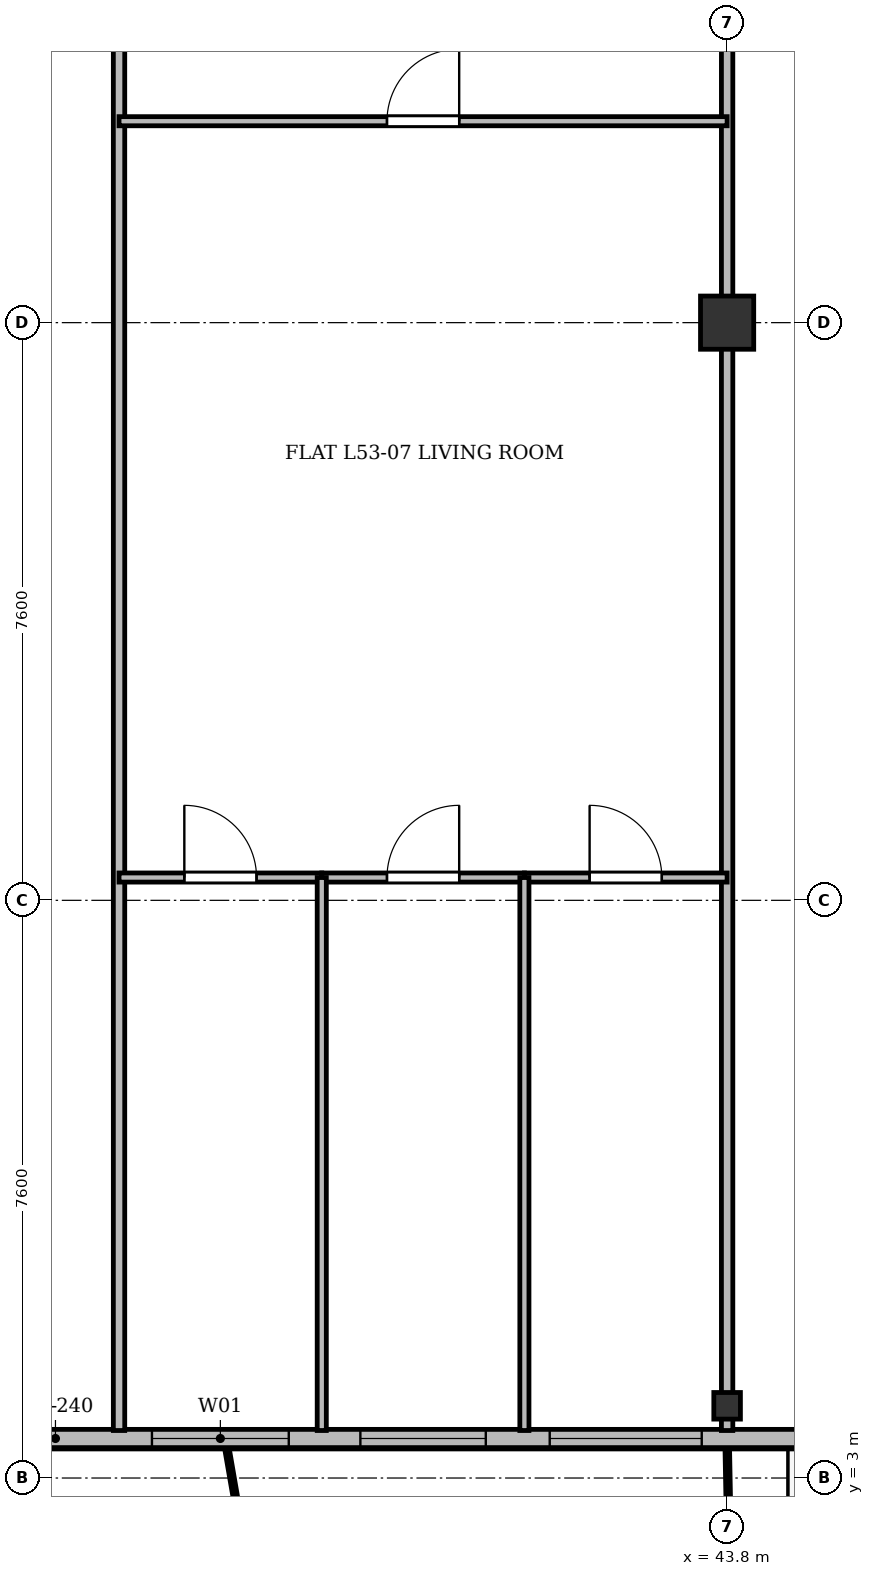
"""IFC4 building model, lengths in metres.
Left out: names, types, materials, properties, quantities, classifications, styles, units other than length and angle.
Written with IfcOpenShell. Run it as: python <this file> out.ifc"""

import sys

from ifc_helpers import new_model, si_unit, direction, frame, frame_2d, origin, origin_2d, place, context, subcontext, project, spatial, rectangle, i_section, extrude, source, transform, mapped, element, fill, save


model = new_model("IFC4")
c1 = context("Model", 3, precision=1e-05, world=origin(), true_north=direction((0.0, 1.0)))
c2 = subcontext(c1, "Body", "Model", "MODEL_VIEW")
j1 = project(units=[si_unit("LENGTHUNIT", "METRE"), si_unit("PLANEANGLEUNIT", "RADIAN")], contexts=[c1])
p1 = place(None, origin())
s1 = spatial("IfcSite", under=j1, at=p1, CompositionType="ELEMENT")
p2 = place(p1, origin())
s2 = spatial("IfcBuilding", under=s1, at=p2, CompositionType="ELEMENT")
p3 = place(p2, frame((0.0, 0.0, 204.9)))
s3 = spatial("IfcBuildingStorey", under=s2, at=p3, CompositionType="ELEMENT", Elevation=204.9)
m1 = source(origin(), c2, "Body", "SweptSolid", [
    extrude(i_section(OverallWidth=0.35, OverallDepth=0.35, WebThickness=0.018, FlangeThickness=0.028, at=origin_2d()), origin(), (0.0, 0.0, 1.0), 3.6),
])
p4 = place(p3, frame((43.8, 3.95, 0.0), z_axis=(0.0, 0.0, 1.0), x_axis=(1.0, 0.0, 0.0)))
e1 = element("IfcColumn", 1, at=p4, inside=s3, PredefinedType="COLUMN", context=c2, shape_type="MappedRepresentation", body=[
    mapped(m1, transform((0.0, 0.0, 0.0), x_axis=(1.0, 0.0, 0.0), y_axis=(0.0, 1.0, 0.0), z_axis=(0.0, 0.0, 1.0), scale=1.0)),
])
m2 = source(origin(), c2, "Body", "SweptSolid", [
    extrude(rectangle(XDim=0.7, YDim=0.7, at=origin_2d()), origin(), (0.0, 0.0, 1.0), 3.6),
])
p5 = place(p3, frame((43.8, 18.2, 0.0), z_axis=(0.0, 0.0, 1.0), x_axis=(1.0, 0.0, 0.0)))
e2 = element("IfcColumn", 2, at=p5, inside=s3, PredefinedType="COLUMN", context=c2, shape_type="MappedRepresentation", body=[
    mapped(m2, transform((0.0, 0.0, 0.0), x_axis=(1.0, 0.0, 0.0), y_axis=(0.0, 1.0, 0.0), z_axis=(0.0, 0.0, 1.0), scale=1.0)),
])
p6 = place(p3, frame((63.4, 3.52, 0.0), z_axis=(0.0, 0.0, 1.0), x_axis=(-1.0, 0.0, 0.0)))
e3 = element("IfcWall", 3, at=p6, inside=s3, PredefinedType="SOLIDWALL", context=c2, shape_type="SweptSolid", body=[
    extrude(rectangle(XDim=52.4, YDim=0.24, at=frame_2d((26.2, 0.0))), origin(), (0.0, 0.0, 1.0), 3.36),
])
p7 = place(p6, frame((1.345, 0.0, 0.9)))
e4 = element("IfcOpeningElement", 4, at=p7, cuts=e3, PredefinedType="OPENING", context=c2, shape_type="SweptSolid", body=[
    extrude(rectangle(XDim=2.0, YDim=1.95, at=frame_2d((1.0, 0.975))), frame((0.0, 0.13, 0.0), z_axis=(0.0, -1.0, 0.0), x_axis=(1.0, 0.0, 0.0)), (0.0, 0.0, 1.0), 0.26),
])
p8 = place(p6, frame((5.075, 0.0, 0.9)))
e5 = element("IfcOpeningElement", 5, at=p8, cuts=e3, PredefinedType="OPENING", context=c2, shape_type="SweptSolid", body=[
    extrude(rectangle(XDim=1.65, YDim=1.85, at=frame_2d((0.825, 0.925))), frame((0.0, 0.13, 0.0), z_axis=(0.0, -1.0, 0.0), x_axis=(1.0, 0.0, 0.0)), (0.0, 0.0, 1.0), 0.26),
])
p9 = place(p6, frame((7.45, 0.0, 0.9)))
e6 = element("IfcOpeningElement", 6, at=p9, cuts=e3, PredefinedType="OPENING", context=c2, shape_type="SweptSolid", body=[
    extrude(rectangle(XDim=1.5, YDim=1.75, at=frame_2d((0.75, 0.875))), frame((0.0, 0.13, 0.0), z_axis=(0.0, -1.0, 0.0), x_axis=(1.0, 0.0, 0.0)), (0.0, 0.0, 1.0), 0.26),
])
p10 = place(p6, frame((9.7, 0.0, 0.9)))
e7 = element("IfcOpeningElement", 7, at=p10, cuts=e3, PredefinedType="OPENING", context=c2, shape_type="SweptSolid", body=[
    extrude(rectangle(XDim=2.2, YDim=1.8, at=frame_2d((1.1, 0.9))), frame((0.0, 0.13, 0.0), z_axis=(0.0, -1.0, 0.0), x_axis=(1.0, 0.0, 0.0)), (0.0, 0.0, 1.0), 0.26),
])
p11 = place(p6, frame((14.217, 0.0, 0.0)))
e8 = element("IfcOpeningElement", 8, at=p11, cuts=e3, PredefinedType="OPENING", context=c2, shape_type="SweptSolid", body=[
    extrude(rectangle(XDim=1.2, YDim=2.2, at=frame_2d((0.6, 1.1))), frame((0.0, 0.13, 0.0), z_axis=(0.0, -1.0, 0.0), x_axis=(1.0, 0.0, 0.0)), (0.0, 0.0, 1.0), 0.26),
])
p12 = place(p6, frame((19.934, 0.0, 0.9)))
e9 = element("IfcOpeningElement", 9, at=p12, cuts=e3, PredefinedType="OPENING", context=c2, shape_type="SweptSolid", body=[
    extrude(rectangle(XDim=2.0, YDim=1.95, at=frame_2d((1.0, 0.975))), frame((0.0, 0.13, 0.0), z_axis=(0.0, -1.0, 0.0), x_axis=(1.0, 0.0, 0.0)), (0.0, 0.0, 1.0), 0.26),
])
p13 = place(p6, frame((22.775, 0.0, 0.9)))
e10 = element("IfcOpeningElement", 10, at=p13, cuts=e3, PredefinedType="OPENING", context=c2, shape_type="SweptSolid", body=[
    extrude(rectangle(XDim=1.65, YDim=1.85, at=frame_2d((0.825, 0.925))), frame((0.0, 0.13, 0.0), z_axis=(0.0, -1.0, 0.0), x_axis=(1.0, 0.0, 0.0)), (0.0, 0.0, 1.0), 0.26),
])
p14 = place(p6, frame((25.367, 0.0, 0.9)))
e11 = element("IfcOpeningElement", 11, at=p14, cuts=e3, PredefinedType="OPENING", context=c2, shape_type="SweptSolid", body=[
    extrude(rectangle(XDim=1.8, YDim=1.8, at=frame_2d((0.9, 0.9))), frame((0.0, 0.13, 0.0), z_axis=(0.0, -1.0, 0.0), x_axis=(1.0, 0.0, 0.0)), (0.0, 0.0, 1.0), 0.26),
])
p15 = place(p6, frame((29.1, 0.0, 0.9)))
e12 = element("IfcOpeningElement", 12, at=p15, cuts=e3, PredefinedType="OPENING", context=c2, shape_type="SweptSolid", body=[
    extrude(rectangle(XDim=2.2, YDim=1.8, at=frame_2d((1.1, 0.9))), frame((0.0, 0.13, 0.0), z_axis=(0.0, -1.0, 0.0), x_axis=(1.0, 0.0, 0.0)), (0.0, 0.0, 1.0), 0.26),
])
p16 = place(p6, frame((33.25, 0.0, 0.9)))
e13 = element("IfcOpeningElement", 13, at=p16, cuts=e3, PredefinedType="OPENING", context=c2, shape_type="SweptSolid", body=[
    extrude(rectangle(XDim=1.5, YDim=1.75, at=frame_2d((0.75, 0.875))), frame((0.0, 0.13, 0.0), z_axis=(0.0, -1.0, 0.0), x_axis=(1.0, 0.0, 0.0)), (0.0, 0.0, 1.0), 0.26),
])
p17 = place(p6, frame((35.65, 0.0, 0.9)))
e14 = element("IfcOpeningElement", 14, at=p17, cuts=e3, PredefinedType="OPENING", context=c2, shape_type="SweptSolid", body=[
    extrude(rectangle(XDim=1.5, YDim=1.75, at=frame_2d((0.75, 0.875))), frame((0.0, 0.13, 0.0), z_axis=(0.0, -1.0, 0.0), x_axis=(1.0, 0.0, 0.0)), (0.0, 0.0, 1.0), 0.26),
])
p18 = place(p6, frame((37.975, 0.0, 0.9)))
e15 = element("IfcOpeningElement", 15, at=p18, cuts=e3, PredefinedType="OPENING", context=c2, shape_type="SweptSolid", body=[
    extrude(rectangle(XDim=1.65, YDim=1.85, at=frame_2d((0.825, 0.925))), frame((0.0, 0.13, 0.0), z_axis=(0.0, -1.0, 0.0), x_axis=(1.0, 0.0, 0.0)), (0.0, 0.0, 1.0), 0.26),
])
p19 = place(p6, frame((41.456, 0.0, 0.0)))
e16 = element("IfcOpeningElement", 16, at=p19, cuts=e3, PredefinedType="OPENING", context=c2, shape_type="SweptSolid", body=[
    extrude(rectangle(XDim=1.2, YDim=2.2, at=frame_2d((0.6, 1.1))), frame((0.0, 0.13, 0.0), z_axis=(0.0, -1.0, 0.0), x_axis=(1.0, 0.0, 0.0)), (0.0, 0.0, 1.0), 0.26),
])
p20 = place(p6, frame((43.45, 0.0, 0.9)))
e17 = element("IfcOpeningElement", 17, at=p20, cuts=e3, PredefinedType="OPENING", context=c2, shape_type="SweptSolid", body=[
    extrude(rectangle(XDim=1.5, YDim=1.75, at=frame_2d((0.75, 0.875))), frame((0.0, 0.13, 0.0), z_axis=(0.0, -1.0, 0.0), x_axis=(1.0, 0.0, 0.0)), (0.0, 0.0, 1.0), 0.26),
])
p21 = place(p6, frame((45.75, 0.0, 0.9)))
e18 = element("IfcOpeningElement", 18, at=p21, cuts=e3, PredefinedType="OPENING", context=c2, shape_type="SweptSolid", body=[
    extrude(rectangle(XDim=1.5, YDim=1.75, at=frame_2d((0.75, 0.875))), frame((0.0, 0.13, 0.0), z_axis=(0.0, -1.0, 0.0), x_axis=(1.0, 0.0, 0.0)), (0.0, 0.0, 1.0), 0.26),
])
p22 = place(p6, frame((49.055, 0.0, 0.9)))
e19 = element("IfcOpeningElement", 19, at=p22, cuts=e3, PredefinedType="OPENING", context=c2, shape_type="SweptSolid", body=[
    extrude(rectangle(XDim=2.0, YDim=1.95, at=frame_2d((1.0, 0.975))), frame((0.0, 0.13, 0.0), z_axis=(0.0, -1.0, 0.0), x_axis=(1.0, 0.0, 0.0)), (0.0, 0.0, 1.0), 0.26),
])
p23 = place(p3, frame((35.8, 3.625, 0.0), z_axis=(0.0, 0.0, 1.0), x_axis=(0.0, 1.0, 0.0)))
e20 = element("IfcWall", 20, at=p23, inside=s3, PredefinedType="PARTITIONING", context=c2, shape_type="SweptSolid", body=[
    extrude(rectangle(XDim=27.175, YDim=0.15, at=frame_2d((13.587, 0.0))), origin(), (0.0, 0.0, 1.0), 2.91),
])
p24 = place(p3, frame((43.8, 3.625, 0.0), z_axis=(0.0, 0.0, 1.0), x_axis=(0.0, 1.0, 0.0)))
e21 = element("IfcWall", 21, at=p24, inside=s3, PredefinedType="PARTITIONING", context=c2, shape_type="SweptSolid", body=[
    extrude(rectangle(XDim=27.175, YDim=0.15, at=frame_2d((13.587, 0.0))), origin(), (0.0, 0.0, 1.0), 2.86),
])
p25 = place(p3, frame((35.8, 20.85, 0.0), z_axis=(0.0, 0.0, 1.0), x_axis=(1.0, 0.0, 0.0)))
e22 = element("IfcWall", 22, at=p25, inside=s3, PredefinedType="PARTITIONING", context=c2, shape_type="SweptSolid", body=[
    extrude(rectangle(XDim=8.0, YDim=0.12, at=frame_2d((4.0, 0.0))), origin(), (0.0, 0.0, 1.0), 2.86),
])
p26 = place(p25, frame((3.525, 0.0, 0.0)))
e23 = element("IfcOpeningElement", 23, at=p26, cuts=e22, PredefinedType="OPENING", context=c2, shape_type="SweptSolid", body=[
    extrude(rectangle(XDim=0.95, YDim=2.15, at=frame_2d((0.475, 1.075))), frame((0.0, 0.07, 0.0), z_axis=(0.0, -1.0, 0.0), x_axis=(1.0, 0.0, 0.0)), (0.0, 0.0, 1.0), 0.14),
])
p27 = place(p3, frame((35.8, 10.9, 0.0), z_axis=(0.0, 0.0, 1.0), x_axis=(1.0, 0.0, 0.0)))
e24 = element("IfcWall", 24, at=p27, inside=s3, PredefinedType="PARTITIONING", context=c2, shape_type="SweptSolid", body=[
    extrude(rectangle(XDim=2.667, YDim=0.12, at=frame_2d((1.333, 0.0))), origin(), (0.0, 0.0, 1.0), 3.36),
])
p28 = place(p27, frame((0.859, 0.0, 0.0)))
e25 = element("IfcOpeningElement", 25, at=p28, cuts=e24, PredefinedType="OPENING", context=c2, shape_type="SweptSolid", body=[
    extrude(rectangle(XDim=0.95, YDim=2.15, at=frame_2d((0.475, 1.075))), frame((0.0, 0.07, 0.0), z_axis=(0.0, -1.0, 0.0), x_axis=(1.0, 0.0, 0.0)), (0.0, 0.0, 1.0), 0.14),
])
p29 = place(p3, frame((38.467, 10.9, 0.0), z_axis=(0.0, 0.0, 1.0), x_axis=(1.0, 0.0, 0.0)))
e26 = element("IfcWall", 26, at=p29, inside=s3, PredefinedType="PARTITIONING", context=c2, shape_type="SweptSolid", body=[
    extrude(rectangle(XDim=2.666, YDim=0.12, at=frame_2d((1.333, 0.0))), origin(), (0.0, 0.0, 1.0), 3.36),
])
p30 = place(p29, frame((0.858, 0.0, 0.0)))
e27 = element("IfcOpeningElement", 27, at=p30, cuts=e26, PredefinedType="OPENING", context=c2, shape_type="SweptSolid", body=[
    extrude(rectangle(XDim=0.95, YDim=2.15, at=frame_2d((0.475, 1.075))), frame((0.0, 0.07, 0.0), z_axis=(0.0, -1.0, 0.0), x_axis=(1.0, 0.0, 0.0)), (0.0, 0.0, 1.0), 0.14),
])
p31 = place(p3, frame((38.467, 3.625, 0.0), z_axis=(0.0, 0.0, 1.0), x_axis=(0.0, 1.0, 0.0)))
e28 = element("IfcWall", 28, at=p31, inside=s3, PredefinedType="PARTITIONING", context=c2, shape_type="SweptSolid", body=[
    extrude(rectangle(XDim=7.275, YDim=0.12, at=frame_2d((3.637, 0.0))), origin(), (0.0, 0.0, 1.0), 2.91),
])
p32 = place(p3, frame((41.133, 10.9, 0.0), z_axis=(0.0, 0.0, 1.0), x_axis=(1.0, 0.0, 0.0)))
e29 = element("IfcWall", 29, at=p32, inside=s3, PredefinedType="PARTITIONING", context=c2, shape_type="SweptSolid", body=[
    extrude(rectangle(XDim=2.667, YDim=0.12, at=frame_2d((1.333, 0.0))), origin(), (0.0, 0.0, 1.0), 2.86),
])
p33 = place(p32, frame((0.858, 0.0, 0.0)))
e30 = element("IfcOpeningElement", 30, at=p33, cuts=e29, PredefinedType="OPENING", context=c2, shape_type="SweptSolid", body=[
    extrude(rectangle(XDim=0.95, YDim=2.15, at=frame_2d((0.475, 1.075))), frame((0.0, 0.07, 0.0), z_axis=(0.0, -1.0, 0.0), x_axis=(1.0, 0.0, 0.0)), (0.0, 0.0, 1.0), 0.14),
])
p34 = place(p3, frame((41.133, 3.625, 0.0), z_axis=(0.0, 0.0, 1.0), x_axis=(0.0, 1.0, 0.0)))
e31 = element("IfcWall", 31, at=p34, inside=s3, PredefinedType="PARTITIONING", context=c2, shape_type="SweptSolid", body=[
    extrude(rectangle(XDim=7.275, YDim=0.12, at=frame_2d((3.637, 0.0))), origin(), (0.0, 0.0, 1.0), 2.91),
])
m3 = source(origin(), c2, "Body", "SweptSolid", [
    extrude(rectangle(XDim=2.0, YDim=1.95, at=frame_2d((1.0, 0.975))), frame((0.0, 0.03, 0.0), z_axis=(0.0, -1.0, 0.0), x_axis=(1.0, 0.0, 0.0)), (0.0, 0.0, 1.0), 0.06),
])
p35 = place(p12, origin())
e32 = element("IfcWindow", 32, at=p35, inside=s3, PartitioningType="SINGLE_PANEL", PredefinedType="WINDOW", context=c2, shape_type="MappedRepresentation", body=[
    mapped(m3, transform((0.0, 0.0, 0.0), x_axis=(1.0, 0.0, 0.0), y_axis=(0.0, 1.0, 0.0), z_axis=(0.0, 0.0, 1.0), scale=1.0)),
])
fill(e9, e32)
m4 = source(origin(), c2, "Body", "SweptSolid", [
    extrude(rectangle(XDim=1.65, YDim=1.85, at=frame_2d((0.825, 0.925))), frame((0.0, 0.03, 0.0), z_axis=(0.0, -1.0, 0.0), x_axis=(1.0, 0.0, 0.0)), (0.0, 0.0, 1.0), 0.06),
])
p36 = place(p13, origin())
e33 = element("IfcWindow", 33, at=p36, inside=s3, PartitioningType="SINGLE_PANEL", PredefinedType="WINDOW", context=c2, shape_type="MappedRepresentation", body=[
    mapped(m4, transform((0.0, 0.0, 0.0), x_axis=(1.0, 0.0, 0.0), y_axis=(0.0, 1.0, 0.0), z_axis=(0.0, 0.0, 1.0), scale=1.0)),
])
fill(e10, e33)
m5 = source(origin(), c2, "Body", "SweptSolid", [
    extrude(rectangle(XDim=1.8, YDim=1.8, at=frame_2d((0.9, 0.9))), frame((0.0, 0.03, 0.0), z_axis=(0.0, -1.0, 0.0), x_axis=(1.0, 0.0, 0.0)), (0.0, 0.0, 1.0), 0.06),
])
p37 = place(p14, origin())
e34 = element("IfcWindow", 34, at=p37, inside=s3, PartitioningType="SINGLE_PANEL", PredefinedType="WINDOW", context=c2, shape_type="MappedRepresentation", body=[
    mapped(m5, transform((0.0, 0.0, 0.0), x_axis=(1.0, 0.0, 0.0), y_axis=(0.0, 1.0, 0.0), z_axis=(0.0, 0.0, 1.0), scale=1.0)),
])
fill(e11, e34)
m6 = source(origin(), c2, "Body", "SweptSolid", [
    extrude(rectangle(XDim=0.95, YDim=2.15, at=frame_2d((0.475, 1.075))), frame((0.0, 0.025, 0.0), z_axis=(0.0, -1.0, 0.0), x_axis=(1.0, 0.0, 0.0)), (0.0, 0.0, 1.0), 0.05),
])
p38 = place(p26, origin())
e35 = element("IfcDoor", 35, at=p38, inside=s3, OperationType="SINGLE_SWING_RIGHT", PredefinedType="DOOR", context=c2, shape_type="MappedRepresentation", body=[
    mapped(m6, transform((0.0, 0.0, 0.0), x_axis=(1.0, 0.0, 0.0), y_axis=(0.0, 1.0, 0.0), z_axis=(0.0, 0.0, 1.0), scale=1.0)),
])
fill(e23, e35)
p39 = place(p28, origin())
e36 = element("IfcDoor", 36, at=p39, inside=s3, OperationType="SINGLE_SWING_LEFT", PredefinedType="DOOR", context=c2, shape_type="MappedRepresentation", body=[
    mapped(m6, transform((0.0, 0.0, 0.0), x_axis=(1.0, 0.0, 0.0), y_axis=(0.0, 1.0, 0.0), z_axis=(0.0, 0.0, 1.0), scale=1.0)),
])
fill(e25, e36)
p40 = place(p30, origin())
e37 = element("IfcDoor", 37, at=p40, inside=s3, OperationType="SINGLE_SWING_RIGHT", PredefinedType="DOOR", context=c2, shape_type="MappedRepresentation", body=[
    mapped(m6, transform((0.0, 0.0, 0.0), x_axis=(1.0, 0.0, 0.0), y_axis=(0.0, 1.0, 0.0), z_axis=(0.0, 0.0, 1.0), scale=1.0)),
])
fill(e27, e37)
p41 = place(p33, origin())
e38 = element("IfcDoor", 38, at=p41, inside=s3, OperationType="SINGLE_SWING_LEFT", PredefinedType="DOOR", context=c2, shape_type="MappedRepresentation", body=[
    mapped(m6, transform((0.0, 0.0, 0.0), x_axis=(1.0, 0.0, 0.0), y_axis=(0.0, 1.0, 0.0), z_axis=(0.0, 0.0, 1.0), scale=1.0)),
])
fill(e30, e38)
save(model, sys.argv[1])
